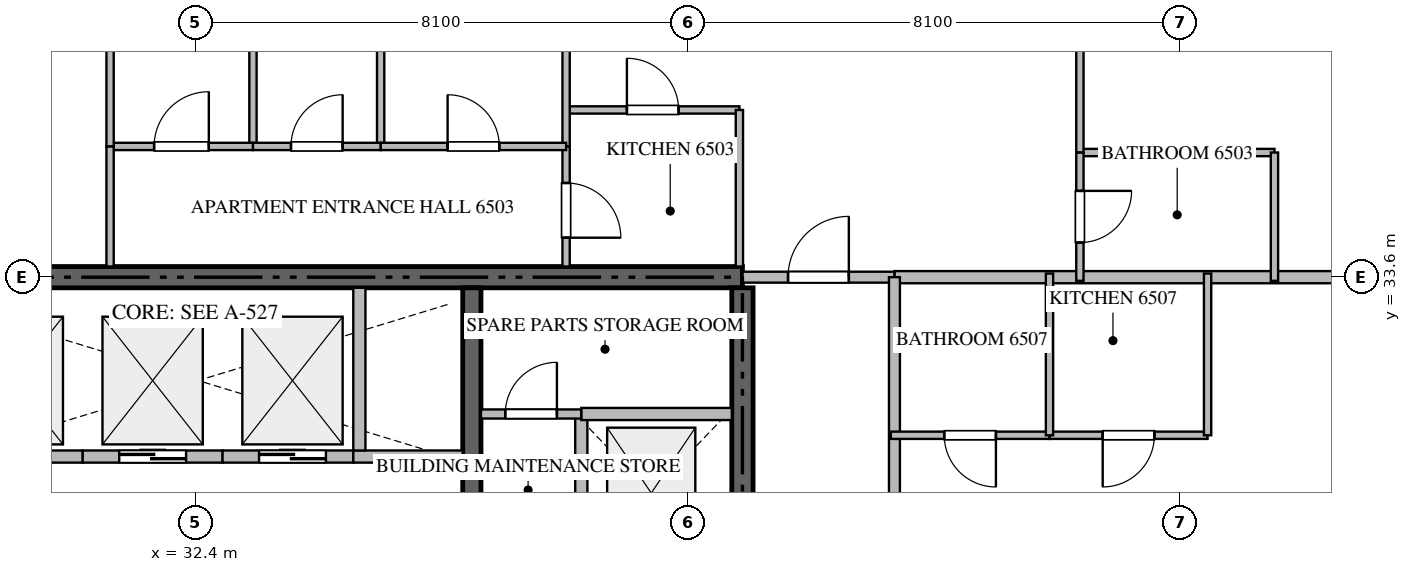
"""IFC4 building model, lengths in metres.
Left out: names, types, materials, properties, quantities, classifications, styles, units other than length and angle.
Written with IfcOpenShell. Run it as: python <this file> out.ifc"""

import sys

from ifc_helpers import new_model, si_unit, direction, frame, frame_2d, origin, place, context, subcontext, project, spatial, rectangle, extrude, source, transform, mapped, element, fill, save


model = new_model("IFC4")
c1 = context("Model", 3, precision=1e-05, world=origin(), true_north=direction((0.0, 1.0)))
c2 = subcontext(c1, "Body", "Model", "MODEL_VIEW")
j1 = project(units=[si_unit("LENGTHUNIT", "METRE"), si_unit("PLANEANGLEUNIT", "RADIAN")], contexts=[c1])
p1 = place(None, origin())
s1 = spatial("IfcSite", under=j1, at=p1, CompositionType="ELEMENT")
p2 = place(p1, origin())
s2 = spatial("IfcBuilding", under=s1, at=p2, CompositionType="ELEMENT")
p3 = place(p2, frame((0.0, 0.0, 260.5)))
s3 = spatial("IfcBuildingStorey", under=s2, at=p3, CompositionType="ELEMENT", Elevation=260.5)
p4 = place(p3, frame((41.4, 33.6, -0.26), z_axis=(0.0, 0.0, 1.0), x_axis=(-1.0, 0.0, 0.0)))
e1 = element("IfcWall", 1, at=p4, inside=s3, PredefinedType="SHEAR", context=c2, shape_type="SweptSolid", body=[
    extrude(rectangle(XDim=18.0, YDim=0.35, at=frame_2d((9.0, 0.0))), origin(), (0.0, 0.0, 1.0), 3.848),
])
p5 = place(p3, frame((41.4, 27.75, -0.26), z_axis=(0.0, 0.0, 1.0), x_axis=(0.0, 1.0, 0.0)))
e2 = element("IfcWall", 2, at=p5, inside=s3, PredefinedType="SHEAR", context=c2, shape_type="SweptSolid", body=[
    extrude(rectangle(XDim=5.675, YDim=0.35, at=frame_2d((2.837, 0.0))), origin(), (0.0, 0.0, 1.0), 3.848),
])
p6 = place(p3, frame((36.95, 27.05, -0.26), z_axis=(0.0, 0.0, 1.0), x_axis=(0.0, 1.0, 0.0)))
e3 = element("IfcWall", 3, at=p6, inside=s3, PredefinedType="SHEAR", context=c2, shape_type="SweptSolid", body=[
    extrude(rectangle(XDim=6.375, YDim=0.3, at=frame_2d((3.188, 0.0))), origin(), (0.0, 0.0, 1.0), 3.848),
])
p7 = place(p3, frame((28.0, 30.65, 0.0), z_axis=(0.0, 0.0, 1.0), x_axis=(1.0, 0.0, 0.0)))
e4 = element("IfcWall", 4, at=p7, inside=s3, PredefinedType="STANDARD", context=c2, shape_type="SweptSolid", body=[
    extrude(rectangle(XDim=2.55, YDim=0.2, at=frame_2d((1.275, 0.0))), origin(), (0.0, 0.0, 1.0), 3.59),
])
p8 = place(p7, frame((0.85, 0.0, 0.0)))
e5 = element("IfcOpeningElement", 5, at=p8, cuts=e4, PredefinedType="OPENING", context=c2, shape_type="SweptSolid", body=[
    extrude(rectangle(XDim=1.1, YDim=2.2, at=frame_2d((0.55, 1.1))), frame((0.0, 0.11, 0.0), z_axis=(0.0, -1.0, 0.0), x_axis=(1.0, 0.0, 0.0)), (0.0, 0.0, 1.0), 0.22),
])
p9 = place(p3, frame((30.55, 30.65, 0.0), z_axis=(0.0, 0.0, 1.0), x_axis=(1.0, 0.0, 0.0)))
e6 = element("IfcWall", 6, at=p9, inside=s3, PredefinedType="STANDARD", context=c2, shape_type="SweptSolid", body=[
    extrude(rectangle(XDim=2.3, YDim=0.2, at=frame_2d((1.15, 0.0))), origin(), (0.0, 0.0, 1.0), 3.59),
])
p10 = place(p9, frame((0.6, 0.0, 0.0)))
e7 = element("IfcOpeningElement", 7, at=p10, cuts=e6, PredefinedType="OPENING", context=c2, shape_type="SweptSolid", body=[
    extrude(rectangle(XDim=1.1, YDim=2.2, at=frame_2d((0.55, 1.1))), frame((0.0, 0.11, 0.0), z_axis=(0.0, -1.0, 0.0), x_axis=(1.0, 0.0, 0.0)), (0.0, 0.0, 1.0), 0.22),
])
p11 = place(p3, frame((32.85, 30.65, 0.0), z_axis=(0.0, 0.0, 1.0), x_axis=(1.0, 0.0, 0.0)))
e8 = element("IfcWall", 8, at=p11, inside=s3, PredefinedType="STANDARD", context=c2, shape_type="SweptSolid", body=[
    extrude(rectangle(XDim=2.15, YDim=0.2, at=frame_2d((1.075, 0.0))), origin(), (0.0, 0.0, 1.0), 3.59),
])
p12 = place(p11, frame((0.6, 0.0, 0.0)))
e9 = element("IfcOpeningElement", 9, at=p12, cuts=e8, PredefinedType="OPENING", context=c2, shape_type="SweptSolid", body=[
    extrude(rectangle(XDim=1.1, YDim=2.2, at=frame_2d((0.55, 1.1))), frame((0.0, 0.11, 0.0), z_axis=(0.0, -1.0, 0.0), x_axis=(1.0, 0.0, 0.0)), (0.0, 0.0, 1.0), 0.22),
])
p13 = place(p3, frame((35.0, 30.65, 0.0), z_axis=(0.0, 0.0, 1.0), x_axis=(1.0, 0.0, 0.0)))
e10 = element("IfcWall", 10, at=p13, inside=s3, PredefinedType="STANDARD", context=c2, shape_type="SweptSolid", body=[
    extrude(rectangle(XDim=1.8, YDim=0.2, at=frame_2d((0.9, 0.0))), origin(), (0.0, 0.0, 1.0), 3.59),
])
p14 = place(p3, frame((35.1, 30.75, 0.0), z_axis=(0.0, 0.0, 1.0), x_axis=(0.0, 1.0, 0.0)))
e11 = element("IfcWall", 11, at=p14, inside=s3, PredefinedType="STANDARD", context=c2, shape_type="SweptSolid", body=[
    extrude(rectangle(XDim=2.675, YDim=0.2, at=frame_2d((1.337, 0.0))), origin(), (0.0, 0.0, 1.0), 3.59),
])
p15 = place(p3, frame((38.75, 28.85, 0.0), z_axis=(0.0, 0.0, 1.0), x_axis=(0.0, 1.0, 0.0)))
e12 = element("IfcWall", 12, at=p15, inside=s3, PredefinedType="STANDARD", context=c2, shape_type="SweptSolid", body=[
    extrude(rectangle(XDim=2.5, YDim=0.2, at=frame_2d((1.25, 0.0))), origin(), (0.0, 0.0, 1.0), 3.59),
])
p16 = place(p3, frame((38.75, 31.35, 0.0), z_axis=(0.0, 0.0, 1.0), x_axis=(1.0, 0.0, 0.0)))
e13 = element("IfcWall", 13, at=p16, inside=s3, PredefinedType="STANDARD", context=c2, shape_type="SweptSolid", body=[
    extrude(rectangle(XDim=2.475, YDim=0.2, at=frame_2d((1.238, 0.0))), origin(), (0.0, 0.0, 1.0), 3.59),
])
p17 = place(p3, frame((37.1, 31.35, 0.0), z_axis=(0.0, 0.0, 1.0), x_axis=(1.0, 0.0, 0.0)))
e14 = element("IfcWall", 14, at=p17, inside=s3, PredefinedType="PARTITIONING", context=c2, shape_type="SweptSolid", body=[
    extrude(rectangle(XDim=1.648, YDim=0.15, at=frame_2d((0.824, 0.0))), origin(), (0.0, 0.0, 1.0), 3.59),
])
p18 = place(p17, frame((0.399, 0.0, 0.0)))
e15 = element("IfcOpeningElement", 15, at=p18, cuts=e14, PredefinedType="OPENING", context=c2, shape_type="SweptSolid", body=[
    extrude(rectangle(XDim=0.85, YDim=2.1, at=frame_2d((0.425, 1.05))), frame((0.0, 0.085, 0.0), z_axis=(0.0, -1.0, 0.0), x_axis=(1.0, 0.0, 0.0)), (0.0, 0.0, 1.0), 0.17),
])
p19 = place(p3, frame((43.9, 33.6, 0.0), z_axis=(0.0, 0.0, 1.0), x_axis=(1.0, 0.0, 0.0)))
e16 = element("IfcWall", 16, at=p19, inside=s3, PredefinedType="PARTITIONING", context=c2, shape_type="SweptSolid", body=[
    extrude(rectangle(XDim=13.418, YDim=0.2, at=frame_2d((6.709, 0.0))), origin(), (0.0, 0.0, 1.0), 3.59),
])
p20 = place(p3, frame((41.402, 33.6, 0.0), z_axis=(0.0, 0.0, 1.0), x_axis=(1.0, 0.0, 0.0)))
e17 = element("IfcWall", 17, at=p20, inside=s3, PredefinedType="PARTITIONING", context=c2, shape_type="SweptSolid", body=[
    extrude(rectangle(XDim=2.496, YDim=0.18, at=frame_2d((1.248, 0.0))), origin(), (0.0, 0.0, 1.0), 3.59),
])
p21 = place(p20, frame((0.748, 0.0, 0.0)))
e18 = element("IfcOpeningElement", 18, at=p21, cuts=e17, PredefinedType="OPENING", context=c2, shape_type="SweptSolid", body=[
    extrude(rectangle(XDim=1.0, YDim=2.15, at=frame_2d((0.5, 1.075))), frame((0.0, 0.1, 0.0), z_axis=(0.0, -1.0, 0.0), x_axis=(1.0, 0.0, 0.0)), (0.0, 0.0, 1.0), 0.2),
])
p22 = place(p3, frame((43.9, 16.8, 0.0), z_axis=(0.0, 0.0, 1.0), x_axis=(0.0, 1.0, 0.0)))
e19 = element("IfcWall", 19, at=p22, inside=s3, PredefinedType="PARTITIONING", context=c2, shape_type="SweptSolid", body=[
    extrude(rectangle(XDim=16.8, YDim=0.18, at=frame_2d((8.4, 0.0))), origin(), (0.0, 0.0, 1.0), 3.59),
])
p23 = place(p22, frame((2.575, 0.0, 0.0)))
e20 = element("IfcOpeningElement", 20, at=p23, cuts=e19, PredefinedType="OPENING", context=c2, shape_type="SweptSolid", body=[
    extrude(rectangle(XDim=1.0, YDim=2.15, at=frame_2d((0.5, 1.075))), frame((0.0, 0.1, 0.0), z_axis=(0.0, -1.0, 0.0), x_axis=(1.0, 0.0, 0.0)), (0.0, 0.0, 1.0), 0.2),
])
p24 = place(p22, frame((10.997, 0.0, 0.0)))
e21 = element("IfcOpeningElement", 21, at=p24, cuts=e19, PredefinedType="OPENING", context=c2, shape_type="SweptSolid", body=[
    extrude(rectangle(XDim=1.0, YDim=2.15, at=frame_2d((0.5, 1.075))), frame((0.0, 0.1, 0.0), z_axis=(0.0, -1.0, 0.0), x_axis=(1.0, 0.0, 0.0)), (0.0, 0.0, 1.0), 0.2),
])
p25 = place(p3, frame((38.5, 36.35, 0.0), z_axis=(0.0, 0.0, 1.0), x_axis=(1.0, 0.0, 0.0)))
e22 = element("IfcWall", 22, at=p25, inside=s3, PredefinedType="PARTITIONING", context=c2, shape_type="SweptSolid", body=[
    extrude(rectangle(XDim=2.85, YDim=0.12, at=frame_2d((1.425, 0.0))), origin(), (0.0, 0.0, 1.0), 3.59),
])
p26 = place(p25, frame((1.0, 0.0, 0.0)))
e23 = element("IfcOpeningElement", 23, at=p26, cuts=e22, PredefinedType="OPENING", context=c2, shape_type="SweptSolid", body=[
    extrude(rectangle(XDim=0.85, YDim=2.1, at=frame_2d((0.425, 1.05))), frame((0.0, 0.07, 0.0), z_axis=(0.0, -1.0, 0.0), x_axis=(1.0, 0.0, 0.0)), (0.0, 0.0, 1.0), 0.14),
])
p27 = place(p3, frame((41.35, 36.35, 0.0), z_axis=(0.0, 0.0, 1.0), x_axis=(0.0, -1.0, 0.0)))
e24 = element("IfcWall", 24, at=p27, inside=s3, PredefinedType="PARTITIONING", context=c2, shape_type="SweptSolid", body=[
    extrude(rectangle(XDim=2.575, YDim=0.12, at=frame_2d((1.288, 0.0))), origin(), (0.0, 0.0, 1.0), 3.59),
])
p28 = place(p3, frame((38.5, 35.75, 0.0), z_axis=(0.0, 0.0, 1.0), x_axis=(0.0, -1.0, 0.0)))
e25 = element("IfcWall", 25, at=p28, inside=s3, PredefinedType="PARTITIONING", context=c2, shape_type="SweptSolid", body=[
    extrude(rectangle(XDim=1.975, YDim=0.12, at=frame_2d((0.988, 0.0))), origin(), (0.0, 0.0, 1.0), 3.59),
])
p29 = place(p28, frame((0.601, 0.0, 0.0)))
e26 = element("IfcOpeningElement", 26, at=p29, cuts=e25, PredefinedType="OPENING", context=c2, shape_type="SweptSolid", body=[
    extrude(rectangle(XDim=0.9, YDim=2.1, at=frame_2d((0.45, 1.05))), frame((0.0, 0.07, 0.0), z_axis=(0.0, -1.0, 0.0), x_axis=(1.0, 0.0, 0.0)), (0.0, 0.0, 1.0), 0.14),
])
p30 = place(p3, frame((38.5, 42.828, 0.0), z_axis=(0.0, 0.0, 1.0), x_axis=(0.0, -1.0, 0.0)))
e27 = element("IfcWall", 27, at=p30, inside=s3, PredefinedType="PARTITIONING", context=c2, shape_type="SweptSolid", body=[
    extrude(rectangle(XDim=7.076, YDim=0.12, at=frame_2d((3.538, 0.0))), origin(), (0.0, 0.0, 1.0), 3.59),
])
p31 = place(p3, frame((33.35, 49.105, 0.0), z_axis=(0.0, 0.0, 1.0), x_axis=(0.0, -1.0, 0.0)))
e28 = element("IfcWall", 28, at=p31, inside=s3, PredefinedType="PARTITIONING", context=c2, shape_type="SweptSolid", body=[
    extrude(rectangle(XDim=13.355, YDim=0.12, at=frame_2d((6.677, 0.0))), origin(), (0.0, 0.0, 1.0), 3.59),
])
p32 = place(p3, frame((35.45, 42.83, 0.0), z_axis=(0.0, 0.0, 1.0), x_axis=(0.0, -1.0, 0.0)))
e29 = element("IfcWall", 29, at=p32, inside=s3, PredefinedType="PARTITIONING", context=c2, shape_type="SweptSolid", body=[
    extrude(rectangle(XDim=7.08, YDim=0.12, at=frame_2d((3.54, 0.0))), origin(), (0.0, 0.0, 1.0), 3.59),
])
p33 = place(p3, frame((33.35, 35.75, 0.0), z_axis=(0.0, 0.0, 1.0), x_axis=(1.0, 0.0, 0.0)))
e30 = element("IfcWall", 30, at=p33, inside=s3, PredefinedType="PARTITIONING", context=c2, shape_type="SweptSolid", body=[
    extrude(rectangle(XDim=2.1, YDim=0.12, at=frame_2d((1.05, 0.0))), origin(), (0.0, 0.0, 1.0), 3.59),
])
p34 = place(p33, frame((0.625, 0.0, 0.0)))
e31 = element("IfcOpeningElement", 31, at=p34, cuts=e30, PredefinedType="OPENING", context=c2, shape_type="SweptSolid", body=[
    extrude(rectangle(XDim=0.85, YDim=2.1, at=frame_2d((0.425, 1.05))), frame((0.0, 0.07, 0.0), z_axis=(0.0, -1.0, 0.0), x_axis=(1.0, 0.0, 0.0)), (0.0, 0.0, 1.0), 0.14),
])
p35 = place(p3, frame((35.452, 35.75, 0.0), z_axis=(0.0, 0.0, 1.0), x_axis=(1.0, 0.0, 0.0)))
e32 = element("IfcWall", 32, at=p35, inside=s3, PredefinedType="PARTITIONING", context=c2, shape_type="SweptSolid", body=[
    extrude(rectangle(XDim=3.048, YDim=0.12, at=frame_2d((1.524, 0.0))), origin(), (0.0, 0.0, 1.0), 3.59),
])
p36 = place(p35, frame((1.099, 0.0, 0.0)))
e33 = element("IfcOpeningElement", 33, at=p36, cuts=e32, PredefinedType="OPENING", context=c2, shape_type="SweptSolid", body=[
    extrude(rectangle(XDim=0.85, YDim=2.1, at=frame_2d((0.425, 1.05))), frame((0.0, 0.07, 0.0), z_axis=(0.0, -1.0, 0.0), x_axis=(1.0, 0.0, 0.0)), (0.0, 0.0, 1.0), 0.14),
])
p37 = place(p3, frame((31.0, 35.75, 0.0), z_axis=(0.0, 0.0, 1.0), x_axis=(1.0, 0.0, 0.0)))
e34 = element("IfcWall", 34, at=p37, inside=s3, PredefinedType="PARTITIONING", context=c2, shape_type="SweptSolid", body=[
    extrude(rectangle(XDim=2.348, YDim=0.12, at=frame_2d((1.174, 0.0))), origin(), (0.0, 0.0, 1.0), 3.59),
])
p38 = place(p37, frame((0.724, 0.0, 0.0)))
e35 = element("IfcOpeningElement", 35, at=p38, cuts=e34, PredefinedType="OPENING", context=c2, shape_type="SweptSolid", body=[
    extrude(rectangle(XDim=0.9, YDim=2.1, at=frame_2d((0.45, 1.05))), frame((0.0, 0.07, 0.0), z_axis=(0.0, -1.0, 0.0), x_axis=(1.0, 0.0, 0.0)), (0.0, 0.0, 1.0), 0.14),
])
p39 = place(p3, frame((31.0, 41.81, 0.0), z_axis=(0.0, 0.0, 1.0), x_axis=(0.0, -1.0, 0.0)))
e36 = element("IfcWall", 36, at=p39, inside=s3, PredefinedType="PARTITIONING", context=c2, shape_type="SweptSolid", body=[
    extrude(rectangle(XDim=6.06, YDim=0.12, at=frame_2d((3.03, 0.0))), origin(), (0.0, 0.0, 1.0), 3.59),
])
p40 = place(p39, frame((2.605, 0.0, 0.0)))
e37 = element("IfcOpeningElement", 37, at=p40, cuts=e36, PredefinedType="OPENING", context=c2, shape_type="SweptSolid", body=[
    extrude(rectangle(XDim=0.85, YDim=2.1, at=frame_2d((0.425, 1.05))), frame((0.0, 0.07, 0.0), z_axis=(0.0, -1.0, 0.0), x_axis=(1.0, 0.0, 0.0)), (0.0, 0.0, 1.0), 0.14),
])
p41 = place(p3, frame((31.0, 35.748, 0.0), z_axis=(0.0, 0.0, 1.0), x_axis=(0.0, -1.0, 0.0)))
e38 = element("IfcWall", 38, at=p41, inside=s3, PredefinedType="PARTITIONING", context=c2, shape_type="SweptSolid", body=[
    extrude(rectangle(XDim=1.973, YDim=0.12, at=frame_2d((0.987, 0.0))), origin(), (0.0, 0.0, 1.0), 3.59),
])
p42 = place(p3, frame((46.95, 35.65, 0.0), z_axis=(0.0, 0.0, 1.0), x_axis=(1.0, 0.0, 0.0)))
e39 = element("IfcWall", 39, at=p42, inside=s3, PredefinedType="PARTITIONING", context=c2, shape_type="SweptSolid", body=[
    extrude(rectangle(XDim=3.2, YDim=0.12, at=frame_2d((1.6, 0.0))), origin(), (0.0, 0.0, 1.0), 3.59),
])
p43 = place(p3, frame((50.15, 35.65, 0.0), z_axis=(0.0, 0.0, 1.0), x_axis=(0.0, -1.0, 0.0)))
e40 = element("IfcWall", 40, at=p43, inside=s3, PredefinedType="PARTITIONING", context=c2, shape_type="SweptSolid", body=[
    extrude(rectangle(XDim=2.11, YDim=0.12, at=frame_2d((1.055, 0.0))), origin(), (0.0, 0.0, 1.0), 3.59),
])
p44 = place(p3, frame((46.95, 41.73, 0.0), z_axis=(0.0, 0.0, 1.0), x_axis=(0.0, -1.0, 0.0)))
e41 = element("IfcWall", 41, at=p44, inside=s3, PredefinedType="PARTITIONING", context=c2, shape_type="SweptSolid", body=[
    extrude(rectangle(XDim=6.08, YDim=0.12, at=frame_2d((3.04, 0.0))), origin(), (0.0, 0.0, 1.0), 3.59),
])
p45 = place(p44, frame((2.615, 0.0, 0.0)))
e42 = element("IfcOpeningElement", 42, at=p45, cuts=e41, PredefinedType="OPENING", context=c2, shape_type="SweptSolid", body=[
    extrude(rectangle(XDim=0.85, YDim=2.1, at=frame_2d((0.425, 1.05))), frame((0.0, 0.07, 0.0), z_axis=(0.0, -1.0, 0.0), x_axis=(1.0, 0.0, 0.0)), (0.0, 0.0, 1.0), 0.14),
])
p46 = place(p3, frame((46.95, 35.648, 0.0), z_axis=(0.0, 0.0, 1.0), x_axis=(0.0, -1.0, 0.0)))
e43 = element("IfcWall", 43, at=p46, inside=s3, PredefinedType="PARTITIONING", context=c2, shape_type="SweptSolid", body=[
    extrude(rectangle(XDim=2.108, YDim=0.12, at=frame_2d((1.054, 0.0))), origin(), (0.0, 0.0, 1.0), 3.59),
])
p47 = place(p46, frame((0.629, 0.0, 0.0)))
e44 = element("IfcOpeningElement", 44, at=p47, cuts=e43, PredefinedType="OPENING", context=c2, shape_type="SweptSolid", body=[
    extrude(rectangle(XDim=0.85, YDim=2.1, at=frame_2d((0.425, 1.05))), frame((0.0, 0.07, 0.0), z_axis=(0.0, -1.0, 0.0), x_axis=(1.0, 0.0, 0.0)), (0.0, 0.0, 1.0), 0.14),
])
p48 = place(p3, frame((49.05, 31.0, 0.0), z_axis=(0.0, 0.0, 1.0), x_axis=(-1.0, 0.0, 0.0)))
e45 = element("IfcWall", 45, at=p48, inside=s3, PredefinedType="PARTITIONING", context=c2, shape_type="SweptSolid", body=[
    extrude(rectangle(XDim=2.6, YDim=0.12, at=frame_2d((1.3, 0.0))), origin(), (0.0, 0.0, 1.0), 3.59),
])
p49 = place(p48, frame((0.875, 0.0, 0.0)))
e46 = element("IfcOpeningElement", 46, at=p49, cuts=e45, PredefinedType="OPENING", context=c2, shape_type="SweptSolid", body=[
    extrude(rectangle(XDim=0.85, YDim=2.1, at=frame_2d((0.425, 1.05))), frame((0.0, 0.07, 0.0), z_axis=(0.0, -1.0, 0.0), x_axis=(1.0, 0.0, 0.0)), (0.0, 0.0, 1.0), 0.14),
])
p50 = place(p3, frame((46.448, 31.0, 0.0), z_axis=(0.0, 0.0, 1.0), x_axis=(-1.0, 0.0, 0.0)))
e47 = element("IfcWall", 47, at=p50, inside=s3, PredefinedType="PARTITIONING", context=c2, shape_type="SweptSolid", body=[
    extrude(rectangle(XDim=2.608, YDim=0.12, at=frame_2d((1.304, 0.0))), origin(), (0.0, 0.0, 1.0), 3.59),
])
p51 = place(p50, frame((0.879, 0.0, 0.0)))
e48 = element("IfcOpeningElement", 48, at=p51, cuts=e47, PredefinedType="OPENING", context=c2, shape_type="SweptSolid", body=[
    extrude(rectangle(XDim=0.85, YDim=2.1, at=frame_2d((0.425, 1.05))), frame((0.0, 0.07, 0.0), z_axis=(0.0, -1.0, 0.0), x_axis=(1.0, 0.0, 0.0)), (0.0, 0.0, 1.0), 0.14),
])
for number, where, z_axis, x_axis in (
    (49, (46.45, 31.0, 0.0), (0.0, 0.0, 1.0), (0.0, 1.0, 0.0)),
    (50, (49.05, 31.0, 0.0), (0.0, 0.0, 1.0), (0.0, 1.0, 0.0)),
):
    element("IfcWall", number, at=place(p3, frame(where, z_axis=z_axis, x_axis=x_axis)), inside=s3, PredefinedType="PARTITIONING", context=c2, shape_type="SweptSolid", body=[
        extrude(rectangle(XDim=2.66, YDim=0.12, at=frame_2d((1.33, 0.0))), origin(), (0.0, 0.0, 1.0), 3.59),
    ])
m1 = source(origin(), c2, "Body", "SweptSolid", [
    extrude(rectangle(XDim=1.1, YDim=2.2, at=frame_2d((0.55, 1.1))), frame((0.0, 0.025, 0.0), z_axis=(0.0, -1.0, 0.0), x_axis=(1.0, 0.0, 0.0)), (0.0, 0.0, 1.0), 0.05),
])
p52 = place(p10, origin())
e51 = element("IfcDoor", 51, at=p52, inside=s3, OperationType="DOUBLE_DOOR_SLIDING", PredefinedType="DOOR", context=c2, shape_type="MappedRepresentation", body=[
    mapped(m1, transform((0.0, 0.0, 0.0), scale=1.0)),
])
fill(e7, e51)
p53 = place(p12, origin())
e52 = element("IfcDoor", 52, at=p53, inside=s3, OperationType="DOUBLE_DOOR_SLIDING", PredefinedType="DOOR", context=c2, shape_type="MappedRepresentation", body=[
    mapped(m1, transform((0.0, 0.0, 0.0), scale=1.0)),
])
fill(e9, e52)
m2 = source(origin(), c2, "Body", "SweptSolid", [
    extrude(rectangle(XDim=0.85, YDim=2.1, at=frame_2d((0.425, 1.05))), frame((0.0, 0.025, 0.0), z_axis=(0.0, -1.0, 0.0), x_axis=(1.0, 0.0, 0.0)), (0.0, 0.0, 1.0), 0.05),
])
p54 = place(p18, origin())
e53 = element("IfcDoor", 53, at=p54, inside=s3, OperationType="SINGLE_SWING_RIGHT", PredefinedType="DOOR", context=c2, shape_type="MappedRepresentation", body=[
    mapped(m2, transform((0.0, 0.0, 0.0), scale=1.0)),
])
fill(e15, e53)
m3 = source(origin(), c2, "Body", "SweptSolid", [
    extrude(rectangle(XDim=1.0, YDim=2.15, at=frame_2d((0.5, 1.075))), frame((0.0, 0.025, 0.0), z_axis=(0.0, -1.0, 0.0), x_axis=(1.0, 0.0, 0.0)), (0.0, 0.0, 1.0), 0.05),
])
p55 = place(p21, origin())
e54 = element("IfcDoor", 54, at=p55, inside=s3, OperationType="SINGLE_SWING_RIGHT", PredefinedType="DOOR", context=c2, shape_type="MappedRepresentation", body=[
    mapped(m3, transform((0.0, 0.0, 0.0), scale=1.0)),
])
fill(e18, e54)
p56 = place(p26, origin())
e55 = element("IfcDoor", 55, at=p56, inside=s3, OperationType="SINGLE_SWING_LEFT", PredefinedType="DOOR", context=c2, shape_type="MappedRepresentation", body=[
    mapped(m2, transform((0.0, 0.0, 0.0), scale=1.0)),
])
fill(e23, e55)
m4 = source(origin(), c2, "Body", "SweptSolid", [
    extrude(rectangle(XDim=0.9, YDim=2.1, at=frame_2d((0.45, 1.05))), frame((0.0, 0.025, 0.0), z_axis=(0.0, -1.0, 0.0), x_axis=(1.0, 0.0, 0.0)), (0.0, 0.0, 1.0), 0.05),
])
p57 = place(p29, origin())
e56 = element("IfcDoor", 56, at=p57, inside=s3, OperationType="SINGLE_SWING_RIGHT", PredefinedType="DOOR", context=c2, shape_type="MappedRepresentation", body=[
    mapped(m4, transform((0.0, 0.0, 0.0), scale=1.0)),
])
fill(e26, e56)
p58 = place(p34, origin())
e57 = element("IfcDoor", 57, at=p58, inside=s3, OperationType="SINGLE_SWING_RIGHT", PredefinedType="DOOR", context=c2, shape_type="MappedRepresentation", body=[
    mapped(m2, transform((0.0, 0.0, 0.0), scale=1.0)),
])
fill(e31, e57)
p59 = place(p36, origin())
e58 = element("IfcDoor", 58, at=p59, inside=s3, OperationType="SINGLE_SWING_LEFT", PredefinedType="DOOR", context=c2, shape_type="MappedRepresentation", body=[
    mapped(m2, transform((0.0, 0.0, 0.0), scale=1.0)),
])
fill(e33, e58)
p60 = place(p38, origin())
e59 = element("IfcDoor", 59, at=p60, inside=s3, OperationType="SINGLE_SWING_RIGHT", PredefinedType="DOOR", context=c2, shape_type="MappedRepresentation", body=[
    mapped(m4, transform((0.0, 0.0, 0.0), scale=1.0)),
])
fill(e35, e59)
p61 = place(p47, origin())
e60 = element("IfcDoor", 60, at=p61, inside=s3, OperationType="SINGLE_SWING_LEFT", PredefinedType="DOOR", context=c2, shape_type="MappedRepresentation", body=[
    mapped(m2, transform((0.0, 0.0, 0.0), scale=1.0)),
])
fill(e44, e60)
p62 = place(p49, origin())
e61 = element("IfcDoor", 61, at=p62, inside=s3, OperationType="SINGLE_SWING_RIGHT", PredefinedType="DOOR", context=c2, shape_type="MappedRepresentation", body=[
    mapped(m2, transform((0.0, 0.0, 0.0), scale=1.0)),
])
fill(e46, e61)
p63 = place(p51, origin())
e62 = element("IfcDoor", 62, at=p63, inside=s3, OperationType="SINGLE_SWING_LEFT", PredefinedType="DOOR", context=c2, shape_type="MappedRepresentation", body=[
    mapped(m2, transform((0.0, 0.0, 0.0), scale=1.0)),
])
fill(e48, e62)
save(model, sys.argv[1])
